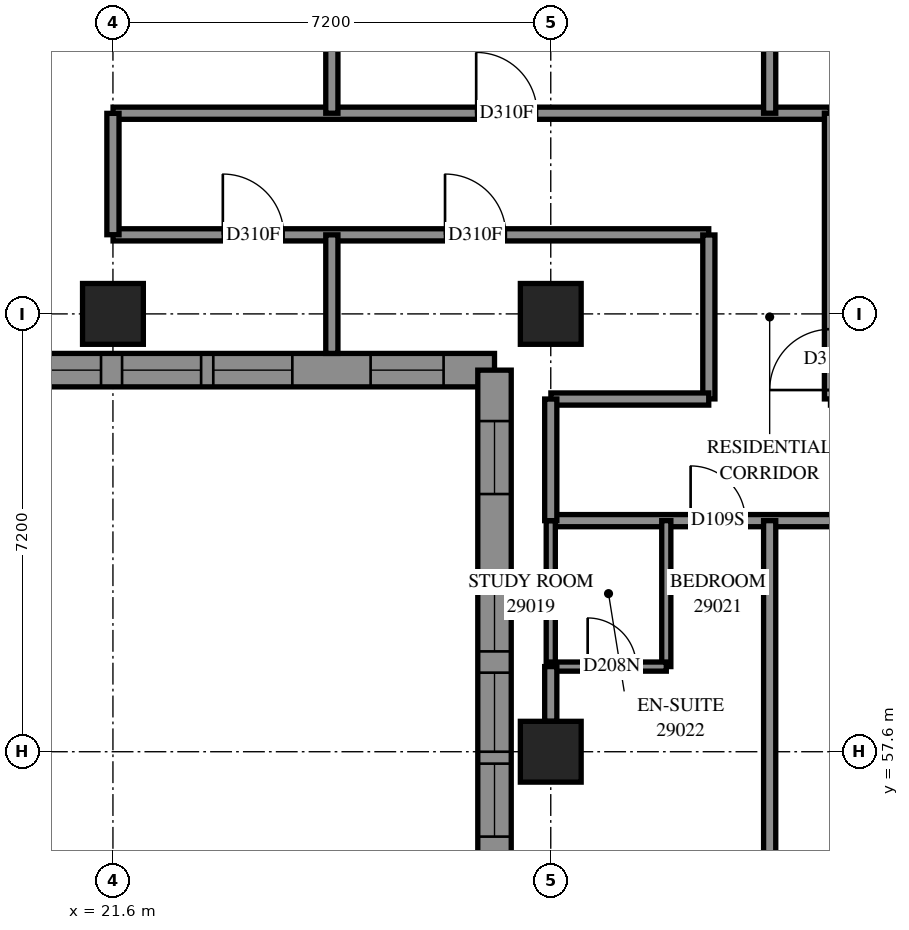
"""IFC4 building model, lengths in metres.
Left out: names, types, materials, properties, quantities, classifications, styles, units other than length and angle.
Written with IfcOpenShell. Run it as: python <this file> out.ifc"""

import sys

from ifc_helpers import new_model, si_unit, direction, frame, frame_2d, origin, origin_2d, place, context, subcontext, project, spatial, polyline, rectangle, outline, extrude, element, fill, save


model = new_model("IFC4")
c1 = context("Model", 3, precision=1e-05, world=origin(), true_north=direction((0.0, 1.0)))
c2 = subcontext(c1, "Body", "Model", "MODEL_VIEW")
j1 = project(units=[si_unit("LENGTHUNIT", "METRE"), si_unit("PLANEANGLEUNIT", "RADIAN")], contexts=[c1])
p1 = place(None, origin())
s1 = spatial("IfcSite", under=j1, at=p1, CompositionType="ELEMENT")
p2 = place(p1, origin())
s2 = spatial("IfcBuilding", under=s1, at=p2, CompositionType="ELEMENT")
p3 = place(p2, frame((0.0, 0.0, 108.4)))
s3 = spatial("IfcBuildingStorey", under=s2, at=p3, CompositionType="ELEMENT", Elevation=108.4)
for number, where, z_axis, x_axis in (
    (1, (21.6, 64.8, 0.0), (0.0, 0.0, 1.0), (1.0, 0.0, 0.0)),
    (2, (28.8, 57.6, 0.0), (0.0, 0.0, 1.0), (1.0, 0.0, 0.0)),
    (3, (28.8, 64.8, 0.0), (0.0, 0.0, 1.0), (1.0, 0.0, 0.0)),
):
    element("IfcColumn", number, at=place(p3, frame(where, z_axis=z_axis, x_axis=x_axis)), inside=s3, PredefinedType="COLUMN", context=c2, shape_type="SweptSolid", body=[
        extrude(rectangle(XDim=1.0, YDim=1.0, at=origin_2d()), origin(), (0.0, 0.0, 1.0), 3.1),
    ])
p4 = place(p3, frame((19.533, 63.875, 0.0), z_axis=(0.0, 0.0, 1.0), x_axis=(1.0, 0.0, 0.0)))
e4 = element("IfcWall", 4, at=p4, inside=s3, PredefinedType="SOLIDWALL", context=c2, shape_type="SweptSolid", body=[
    extrude(outline(polyline([(-0.275, -0.275), (8.067, -0.275), (8.617, 0.275), (0.275, 0.275), (-0.275, -0.275)])), origin(), (0.0, 0.0, 1.0), 3.1),
])
p5 = place(p4, frame((2.217, 0.0, 0.5)))
e5 = element("IfcOpeningElement", 5, at=p5, cuts=e4, PredefinedType="OPENING", context=c2, shape_type="SweptSolid", body=[
    extrude(rectangle(XDim=1.3, YDim=2.45, at=frame_2d((0.65, 1.225))), frame((0.0, 0.285, 0.0), z_axis=(0.0, -1.0, 0.0), x_axis=(1.0, 0.0, 0.0)), (0.0, 0.0, 1.0), 0.57),
])
p6 = place(p4, frame((3.717, 0.0, 0.5)))
e6 = element("IfcOpeningElement", 6, at=p6, cuts=e4, PredefinedType="OPENING", context=c2, shape_type="SweptSolid", body=[
    extrude(rectangle(XDim=1.3, YDim=2.45, at=frame_2d((0.65, 1.225))), frame((0.0, 0.285, 0.0), z_axis=(0.0, -1.0, 0.0), x_axis=(1.0, 0.0, 0.0)), (0.0, 0.0, 1.0), 0.57),
])
p7 = place(p4, frame((0.671, 0.0, 0.5)))
e7 = element("IfcOpeningElement", 7, at=p7, cuts=e4, PredefinedType="OPENING", context=c2, shape_type="SweptSolid", body=[
    extrude(rectangle(XDim=1.2, YDim=2.45, at=frame_2d((0.6, 1.225))), frame((0.0, 0.285, 0.0), z_axis=(0.0, -1.0, 0.0), x_axis=(1.0, 0.0, 0.0)), (0.0, 0.0, 1.0), 0.57),
])
p8 = place(p4, frame((6.304, 0.0, 0.5)))
e8 = element("IfcOpeningElement", 8, at=p8, cuts=e4, PredefinedType="OPENING", context=c2, shape_type="SweptSolid", body=[
    extrude(rectangle(XDim=1.2, YDim=2.45, at=frame_2d((0.6, 1.225))), frame((0.0, 0.285, 0.0), z_axis=(0.0, -1.0, 0.0), x_axis=(1.0, 0.0, 0.0)), (0.0, 0.0, 1.0), 0.57),
])
p9 = place(p3, frame((27.875, 63.875, 0.0), z_axis=(0.0, 0.0, 1.0), x_axis=(0.0, -1.0, 0.0)))
e9 = element("IfcWall", 9, at=p9, inside=s3, PredefinedType="SOLIDWALL", context=c2, shape_type="SweptSolid", body=[
    extrude(outline(polyline([(0.275, -0.275), (8.617, -0.275), (8.067, 0.275), (-0.275, 0.275), (0.275, -0.275)])), origin(), (0.0, 0.0, 1.0), 3.1),
])
p10 = place(p9, frame((3.325, 0.0, 0.5)))
e10 = element("IfcOpeningElement", 10, at=p10, cuts=e9, PredefinedType="OPENING", context=c2, shape_type="SweptSolid", body=[
    extrude(rectangle(XDim=1.3, YDim=2.45, at=frame_2d((0.65, 1.225))), frame((0.0, 0.285, 0.0), z_axis=(0.0, -1.0, 0.0), x_axis=(1.0, 0.0, 0.0)), (0.0, 0.0, 1.0), 0.57),
])
p11 = place(p9, frame((4.975, 0.0, 0.5)))
e11 = element("IfcOpeningElement", 11, at=p11, cuts=e9, PredefinedType="OPENING", context=c2, shape_type="SweptSolid", body=[
    extrude(rectangle(XDim=1.3, YDim=2.45, at=frame_2d((0.65, 1.225))), frame((0.0, 0.285, 0.0), z_axis=(0.0, -1.0, 0.0), x_axis=(1.0, 0.0, 0.0)), (0.0, 0.0, 1.0), 0.57),
])
p12 = place(p9, frame((0.838, 0.0, 0.5)))
e12 = element("IfcOpeningElement", 12, at=p12, cuts=e9, PredefinedType="OPENING", context=c2, shape_type="SweptSolid", body=[
    extrude(rectangle(XDim=1.2, YDim=2.45, at=frame_2d((0.6, 1.225))), frame((0.0, 0.285, 0.0), z_axis=(0.0, -1.0, 0.0), x_axis=(1.0, 0.0, 0.0)), (0.0, 0.0, 1.0), 0.57),
])
p13 = place(p9, frame((6.471, 0.0, 0.5)))
e13 = element("IfcOpeningElement", 13, at=p13, cuts=e9, PredefinedType="OPENING", context=c2, shape_type="SweptSolid", body=[
    extrude(rectangle(XDim=1.2, YDim=2.45, at=frame_2d((0.6, 1.225))), frame((0.0, 0.285, 0.0), z_axis=(0.0, -1.0, 0.0), x_axis=(1.0, 0.0, 0.0)), (0.0, 0.0, 1.0), 0.57),
])
p14 = place(p3, frame((28.8, 61.4, 0.0), z_axis=(0.0, 0.0, 1.0), x_axis=(1.0, 0.0, 0.0)))
e14 = element("IfcWall", 14, at=p14, inside=s3, PredefinedType="PARTITIONING", context=c2, shape_type="SweptSolid", body=[
    extrude(rectangle(XDim=24.2, YDim=0.2, at=frame_2d((12.1, 0.0))), origin(), (0.0, 0.0, 1.0), 3.1),
])
p15 = place(p14, frame((2.3, 0.0, 0.0)))
e15 = element("IfcOpeningElement", 15, at=p15, cuts=e14, PredefinedType="OPENING", context=c2, shape_type="SweptSolid", body=[
    extrude(rectangle(XDim=0.9, YDim=2.1, at=frame_2d((0.45, 1.05))), frame((0.0, 0.11, 0.0), z_axis=(0.0, -1.0, 0.0), x_axis=(1.0, 0.0, 0.0)), (0.0, 0.0, 1.0), 0.22),
])
p16 = place(p14, frame((5.901, 0.0, 0.0)))
e16 = element("IfcOpeningElement", 16, at=p16, cuts=e14, PredefinedType="OPENING", context=c2, shape_type="SweptSolid", body=[
    extrude(rectangle(XDim=0.9, YDim=2.1, at=frame_2d((0.45, 1.05))), frame((0.0, 0.11, 0.0), z_axis=(0.0, -1.0, 0.0), x_axis=(1.0, 0.0, 0.0)), (0.0, 0.0, 1.0), 0.22),
])
p17 = place(p14, frame((11.307, 0.0, 0.0)))
e17 = element("IfcOpeningElement", 17, at=p17, cuts=e14, PredefinedType="OPENING", context=c2, shape_type="SweptSolid", body=[
    extrude(rectangle(XDim=1.0, YDim=2.1, at=frame_2d((0.5, 1.05))), frame((0.0, 0.11, 0.0), z_axis=(0.0, -1.0, 0.0), x_axis=(1.0, 0.0, 0.0)), (0.0, 0.0, 1.0), 0.22),
])
p18 = place(p14, frame((16.7, 0.0, 0.0)))
e18 = element("IfcOpeningElement", 18, at=p18, cuts=e14, PredefinedType="OPENING", context=c2, shape_type="SweptSolid", body=[
    extrude(rectangle(XDim=0.9, YDim=2.1, at=frame_2d((0.45, 1.05))), frame((0.0, 0.11, 0.0), z_axis=(0.0, -1.0, 0.0), x_axis=(1.0, 0.0, 0.0)), (0.0, 0.0, 1.0), 0.22),
])
p19 = place(p14, frame((18.508, 0.0, 0.0)))
e19 = element("IfcOpeningElement", 19, at=p19, cuts=e14, PredefinedType="OPENING", context=c2, shape_type="SweptSolid", body=[
    extrude(rectangle(XDim=1.0, YDim=2.1, at=frame_2d((0.5, 1.05))), frame((0.0, 0.11, 0.0), z_axis=(0.0, -1.0, 0.0), x_axis=(1.0, 0.0, 0.0)), (0.0, 0.0, 1.0), 0.22),
])
p20 = place(p14, frame((23.074, 0.0, 0.0)))
e20 = element("IfcOpeningElement", 20, at=p20, cuts=e14, PredefinedType="OPENING", context=c2, shape_type="SweptSolid", body=[
    extrude(rectangle(XDim=1.0, YDim=2.1, at=frame_2d((0.5, 1.05))), frame((0.0, 0.11, 0.0), z_axis=(0.0, -1.0, 0.0), x_axis=(1.0, 0.0, 0.0)), (0.0, 0.0, 1.0), 0.22),
])
p21 = place(p3, frame((21.602, 68.1, 0.0), z_axis=(0.0, 0.0, 1.0), x_axis=(1.0, 0.0, 0.0)))
e21 = element("IfcWall", 21, at=p21, inside=s3, PredefinedType="PARTITIONING", context=c2, shape_type="SweptSolid", body=[
    extrude(rectangle(XDim=11.798, YDim=0.2, at=frame_2d((5.899, 0.0))), origin(), (0.0, 0.0, 1.0), 3.1),
])
p22 = place(p21, frame((5.972, 0.0, 0.0)))
e22 = element("IfcOpeningElement", 22, at=p22, cuts=e21, PredefinedType="OPENING", context=c2, shape_type="SweptSolid", body=[
    extrude(rectangle(XDim=1.0, YDim=2.1, at=frame_2d((0.5, 1.05))), frame((0.0, 0.11, 0.0), z_axis=(0.0, -1.0, 0.0), x_axis=(1.0, 0.0, 0.0)), (0.0, 0.0, 1.0), 0.22),
])
p23 = place(p3, frame((21.602, 66.1, 0.0), z_axis=(0.0, 0.0, 1.0), x_axis=(1.0, 0.0, 0.0)))
e23 = element("IfcWall", 23, at=p23, inside=s3, PredefinedType="PARTITIONING", context=c2, shape_type="SweptSolid", body=[
    extrude(rectangle(XDim=9.796, YDim=0.2, at=frame_2d((4.898, 0.0))), origin(), (0.0, 0.0, 1.0), 3.1),
])
p24 = place(p23, frame((1.805, 0.0, 0.0)))
e24 = element("IfcOpeningElement", 24, at=p24, cuts=e23, PredefinedType="OPENING", context=c2, shape_type="SweptSolid", body=[
    extrude(rectangle(XDim=1.0, YDim=2.1, at=frame_2d((0.5, 1.05))), frame((0.0, 0.11, 0.0), z_axis=(0.0, -1.0, 0.0), x_axis=(1.0, 0.0, 0.0)), (0.0, 0.0, 1.0), 0.22),
])
p25 = place(p23, frame((5.459, 0.0, 0.0)))
e25 = element("IfcOpeningElement", 25, at=p25, cuts=e23, PredefinedType="OPENING", context=c2, shape_type="SweptSolid", body=[
    extrude(rectangle(XDim=1.0, YDim=2.1, at=frame_2d((0.5, 1.05))), frame((0.0, 0.11, 0.0), z_axis=(0.0, -1.0, 0.0), x_axis=(1.0, 0.0, 0.0)), (0.0, 0.0, 1.0), 0.22),
])
p26 = place(p3, frame((32.4, 55.808, 0.0), z_axis=(0.0, 0.0, 1.0), x_axis=(0.0, 1.0, 0.0)))
e26 = element("IfcWall", 26, at=p26, inside=s3, PredefinedType="PARTITIONING", context=c2, shape_type="SweptSolid", body=[
    extrude(rectangle(XDim=5.592, YDim=0.2, at=frame_2d((2.796, 0.0))), origin(), (0.0, 0.0, 1.0), 3.1),
])
p27 = place(p3, frame((25.2, 68.1, 0.0), z_axis=(0.0, 0.0, 1.0), x_axis=(0.0, 1.0, 0.0)))
e27 = element("IfcWall", 27, at=p27, inside=s3, PredefinedType="PARTITIONING", context=c2, shape_type="SweptSolid", body=[
    extrude(rectangle(XDim=4.848, YDim=0.2, at=frame_2d((2.424, 0.0))), origin(), (0.0, 0.0, 1.0), 3.1),
])
p28 = place(p3, frame((32.4, 68.1, 0.0), z_axis=(0.0, 0.0, 1.0), x_axis=(0.0, 1.0, 0.0)))
e28 = element("IfcWall", 28, at=p28, inside=s3, PredefinedType="PARTITIONING", context=c2, shape_type="SweptSolid", body=[
    extrude(rectangle(XDim=4.79, YDim=0.2, at=frame_2d((2.395, 0.0))), origin(), (0.0, 0.0, 1.0), 3.1),
])
p29 = place(p3, frame((33.4, 63.402, 0.0), z_axis=(0.0, 0.0, 1.0), x_axis=(0.0, 1.0, 0.0)))
e29 = element("IfcWall", 29, at=p29, inside=s3, PredefinedType="PARTITIONING", context=c2, shape_type="SweptSolid", body=[
    extrude(rectangle(XDim=4.698, YDim=0.2, at=frame_2d((2.349, 0.0))), origin(), (0.0, 0.0, 1.0), 3.1),
])
p30 = place(p29, frame((0.146, 0.0, 0.0)))
e30 = element("IfcOpeningElement", 30, at=p30, cuts=e29, PredefinedType="OPENING", context=c2, shape_type="SweptSolid", body=[
    extrude(rectangle(XDim=1.0, YDim=2.1, at=frame_2d((0.5, 1.05))), frame((0.0, 0.11, 0.0), z_axis=(0.0, -1.0, 0.0), x_axis=(1.0, 0.0, 0.0)), (0.0, 0.0, 1.0), 0.22),
])
p31 = place(p3, frame((31.4, 63.402, 0.0), z_axis=(0.0, 0.0, 1.0), x_axis=(0.0, 1.0, 0.0)))
e31 = element("IfcWall", 31, at=p31, inside=s3, PredefinedType="PARTITIONING", context=c2, shape_type="SweptSolid", body=[
    extrude(rectangle(XDim=2.696, YDim=0.2, at=frame_2d((1.348, 0.0))), origin(), (0.0, 0.0, 1.0), 3.1),
])
p32 = place(p3, frame((28.802, 63.4, 0.0), z_axis=(0.0, 0.0, 1.0), x_axis=(1.0, 0.0, 0.0)))
e32 = element("IfcWall", 32, at=p32, inside=s3, PredefinedType="PARTITIONING", context=c2, shape_type="SweptSolid", body=[
    extrude(rectangle(XDim=2.596, YDim=0.2, at=frame_2d((1.298, 0.0))), origin(), (0.0, 0.0, 1.0), 3.1),
])
p33 = place(p3, frame((30.7, 59.0, 0.0), z_axis=(0.0, 0.0, 1.0), x_axis=(0.0, 1.0, 0.0)))
e33 = element("IfcWall", 33, at=p33, inside=s3, PredefinedType="PARTITIONING", context=c2, shape_type="SweptSolid", body=[
    extrude(rectangle(XDim=2.4, YDim=0.15, at=frame_2d((1.2, 0.0))), origin(), (0.0, 0.0, 1.0), 3.1),
])
p34 = place(p3, frame((28.8, 59.0, 0.0), z_axis=(0.0, 0.0, 1.0), x_axis=(0.0, 1.0, 0.0)))
e34 = element("IfcWall", 34, at=p34, inside=s3, PredefinedType="PARTITIONING", context=c2, shape_type="SweptSolid", body=[
    extrude(rectangle(XDim=2.4, YDim=0.15, at=frame_2d((1.2, 0.0))), origin(), (0.0, 0.0, 1.0), 2.6),
])
p35 = place(p3, frame((28.8, 61.4, 0.0), z_axis=(0.0, 0.0, 1.0), x_axis=(0.0, 1.0, 0.0)))
e35 = element("IfcWall", 35, at=p35, inside=s3, PredefinedType="PARTITIONING", context=c2, shape_type="SweptSolid", body=[
    extrude(rectangle(XDim=2.0, YDim=0.2, at=frame_2d((1.0, 0.0))), origin(), (0.0, 0.0, 1.0), 2.6),
])
p36 = place(p3, frame((21.6, 66.102, 0.0), z_axis=(0.0, 0.0, 1.0), x_axis=(0.0, 1.0, 0.0)))
e36 = element("IfcWall", 36, at=p36, inside=s3, PredefinedType="PARTITIONING", context=c2, shape_type="SweptSolid", body=[
    extrude(rectangle(XDim=1.996, YDim=0.2, at=frame_2d((0.998, 0.0))), origin(), (0.0, 0.0, 1.0), 2.6),
])
p37 = place(p3, frame((28.8, 59.0, 0.0), z_axis=(0.0, 0.0, 1.0), x_axis=(1.0, 0.0, 0.0)))
e37 = element("IfcWall", 37, at=p37, inside=s3, PredefinedType="PARTITIONING", context=c2, shape_type="SweptSolid", body=[
    extrude(rectangle(XDim=1.9, YDim=0.15, at=frame_2d((0.95, 0.0))), origin(), (0.0, 0.0, 1.0), 3.1),
])
p38 = place(p37, frame((0.607, 0.0, 0.0)))
e38 = element("IfcOpeningElement", 38, at=p38, cuts=e37, PredefinedType="OPENING", context=c2, shape_type="SweptSolid", body=[
    extrude(rectangle(XDim=0.8, YDim=2.1, at=frame_2d((0.4, 1.05))), frame((0.0, 0.085, 0.0), z_axis=(0.0, -1.0, 0.0), x_axis=(1.0, 0.0, 0.0)), (0.0, 0.0, 1.0), 0.17),
])
p39 = place(p3, frame((25.2, 64.15, 0.0), z_axis=(0.0, 0.0, 1.0), x_axis=(0.0, 1.0, 0.0)))
e39 = element("IfcWall", 39, at=p39, inside=s3, PredefinedType="PARTITIONING", context=c2, shape_type="SweptSolid", body=[
    extrude(rectangle(XDim=1.95, YDim=0.2, at=frame_2d((0.975, 0.0))), origin(), (0.0, 0.0, 1.0), 3.1),
])
p40 = place(p3, frame((28.8, 58.1, 0.0), z_axis=(0.0, 0.0, 1.0), x_axis=(0.0, 1.0, 0.0)))
e40 = element("IfcWall", 40, at=p40, inside=s3, PredefinedType="PARTITIONING", context=c2, shape_type="SweptSolid", body=[
    extrude(rectangle(XDim=0.9, YDim=0.2, at=frame_2d((0.45, 0.0))), origin(), (0.0, 0.0, 1.0), 2.6),
])
p41 = place(p5, origin())
e41 = element("IfcWindow", 41, at=p41, inside=s3, PartitioningType="SINGLE_PANEL", PredefinedType="WINDOW", context=c2, shape_type="SweptSolid", body=[
    extrude(rectangle(XDim=1.3, YDim=2.45, at=frame_2d((0.65, 1.225))), frame((0.0, 0.155, 0.0), z_axis=(0.0, -1.0, 0.0), x_axis=(1.0, 0.0, 0.0)), (0.0, 0.0, 1.0), 0.06),
])
fill(e5, e41)
p42 = place(p6, origin())
e42 = element("IfcWindow", 42, at=p42, inside=s3, PartitioningType="SINGLE_PANEL", PredefinedType="WINDOW", context=c2, shape_type="SweptSolid", body=[
    extrude(rectangle(XDim=1.3, YDim=2.45, at=frame_2d((0.65, 1.225))), frame((0.0, 0.155, 0.0), z_axis=(0.0, -1.0, 0.0), x_axis=(1.0, 0.0, 0.0)), (0.0, 0.0, 1.0), 0.06),
])
fill(e6, e42)
p43 = place(p7, origin())
e43 = element("IfcWindow", 43, at=p43, inside=s3, PartitioningType="SINGLE_PANEL", PredefinedType="WINDOW", context=c2, shape_type="SweptSolid", body=[
    extrude(rectangle(XDim=1.2, YDim=2.45, at=frame_2d((0.6, 1.225))), frame((0.0, 0.155, 0.0), z_axis=(0.0, -1.0, 0.0), x_axis=(1.0, 0.0, 0.0)), (0.0, 0.0, 1.0), 0.06),
])
fill(e7, e43)
p44 = place(p8, origin())
e44 = element("IfcWindow", 44, at=p44, inside=s3, PartitioningType="SINGLE_PANEL", PredefinedType="WINDOW", context=c2, shape_type="SweptSolid", body=[
    extrude(rectangle(XDim=1.2, YDim=2.45, at=frame_2d((0.6, 1.225))), frame((0.0, 0.155, 0.0), z_axis=(0.0, -1.0, 0.0), x_axis=(1.0, 0.0, 0.0)), (0.0, 0.0, 1.0), 0.06),
])
fill(e8, e44)
p45 = place(p10, origin())
e45 = element("IfcWindow", 45, at=p45, inside=s3, PartitioningType="SINGLE_PANEL", PredefinedType="WINDOW", context=c2, shape_type="SweptSolid", body=[
    extrude(rectangle(XDim=1.3, YDim=2.45, at=frame_2d((0.65, 1.225))), frame((0.0, 0.155, 0.0), z_axis=(0.0, -1.0, 0.0), x_axis=(1.0, 0.0, 0.0)), (0.0, 0.0, 1.0), 0.06),
])
fill(e10, e45)
p46 = place(p11, origin())
e46 = element("IfcWindow", 46, at=p46, inside=s3, PartitioningType="SINGLE_PANEL", PredefinedType="WINDOW", context=c2, shape_type="SweptSolid", body=[
    extrude(rectangle(XDim=1.3, YDim=2.45, at=frame_2d((0.65, 1.225))), frame((0.0, 0.155, 0.0), z_axis=(0.0, -1.0, 0.0), x_axis=(1.0, 0.0, 0.0)), (0.0, 0.0, 1.0), 0.06),
])
fill(e11, e46)
p47 = place(p12, origin())
e47 = element("IfcWindow", 47, at=p47, inside=s3, PartitioningType="SINGLE_PANEL", PredefinedType="WINDOW", context=c2, shape_type="SweptSolid", body=[
    extrude(rectangle(XDim=1.2, YDim=2.45, at=frame_2d((0.6, 1.225))), frame((0.0, 0.155, 0.0), z_axis=(0.0, -1.0, 0.0), x_axis=(1.0, 0.0, 0.0)), (0.0, 0.0, 1.0), 0.06),
])
fill(e12, e47)
p48 = place(p13, origin())
e48 = element("IfcWindow", 48, at=p48, inside=s3, PartitioningType="SINGLE_PANEL", PredefinedType="WINDOW", context=c2, shape_type="SweptSolid", body=[
    extrude(rectangle(XDim=1.2, YDim=2.45, at=frame_2d((0.6, 1.225))), frame((0.0, 0.155, 0.0), z_axis=(0.0, -1.0, 0.0), x_axis=(1.0, 0.0, 0.0)), (0.0, 0.0, 1.0), 0.06),
])
fill(e13, e48)
p49 = place(p24, origin())
e49 = element("IfcDoor", 49, at=p49, inside=s3, OperationType="SINGLE_SWING_RIGHT", PredefinedType="DOOR", context=c2, shape_type="SweptSolid", body=[
    extrude(rectangle(XDim=1.0, YDim=2.1, at=frame_2d((0.5, 1.05))), frame((0.0, 0.025, 0.0), z_axis=(0.0, -1.0, 0.0), x_axis=(1.0, 0.0, 0.0)), (0.0, 0.0, 1.0), 0.05),
])
fill(e24, e49)
p50 = place(p25, origin())
e50 = element("IfcDoor", 50, at=p50, inside=s3, OperationType="SINGLE_SWING_RIGHT", PredefinedType="DOOR", context=c2, shape_type="SweptSolid", body=[
    extrude(rectangle(XDim=1.0, YDim=2.1, at=frame_2d((0.5, 1.05))), frame((0.0, 0.025, 0.0), z_axis=(0.0, -1.0, 0.0), x_axis=(1.0, 0.0, 0.0)), (0.0, 0.0, 1.0), 0.05),
])
fill(e25, e50)
p51 = place(p22, origin())
e51 = element("IfcDoor", 51, at=p51, inside=s3, OperationType="SINGLE_SWING_LEFT", PredefinedType="DOOR", context=c2, shape_type="SweptSolid", body=[
    extrude(rectangle(XDim=1.0, YDim=2.1, at=frame_2d((0.5, 1.05))), frame((0.0, 0.025, 0.0), z_axis=(0.0, -1.0, 0.0), x_axis=(1.0, 0.0, 0.0)), (0.0, 0.0, 1.0), 0.05),
])
fill(e22, e51)
p52 = place(p15, origin())
e52 = element("IfcDoor", 52, at=p52, inside=s3, OperationType="SINGLE_SWING_LEFT", PredefinedType="DOOR", context=c2, shape_type="SweptSolid", body=[
    extrude(rectangle(XDim=0.9, YDim=2.1, at=frame_2d((0.45, 1.05))), frame((0.0, 0.025, 0.0), z_axis=(0.0, -1.0, 0.0), x_axis=(1.0, 0.0, 0.0)), (0.0, 0.0, 1.0), 0.05),
])
fill(e15, e52)
p53 = place(p38, origin())
e53 = element("IfcDoor", 53, at=p53, inside=s3, OperationType="SINGLE_SWING_RIGHT", PredefinedType="DOOR", context=c2, shape_type="SweptSolid", body=[
    extrude(rectangle(XDim=0.8, YDim=2.1, at=frame_2d((0.4, 1.05))), frame((0.0, 0.025, 0.0), z_axis=(0.0, -1.0, 0.0), x_axis=(1.0, 0.0, 0.0)), (0.0, 0.0, 1.0), 0.05),
])
fill(e38, e53)
p54 = place(p30, origin())
e54 = element("IfcDoor", 54, at=p54, inside=s3, OperationType="SINGLE_SWING_LEFT", PredefinedType="DOOR", context=c2, shape_type="SweptSolid", body=[
    extrude(rectangle(XDim=1.0, YDim=2.1, at=frame_2d((0.5, 1.05))), frame((0.0, 0.025, 0.0), z_axis=(0.0, -1.0, 0.0), x_axis=(1.0, 0.0, 0.0)), (0.0, 0.0, 1.0), 0.05),
])
fill(e30, e54)
save(model, sys.argv[1])
